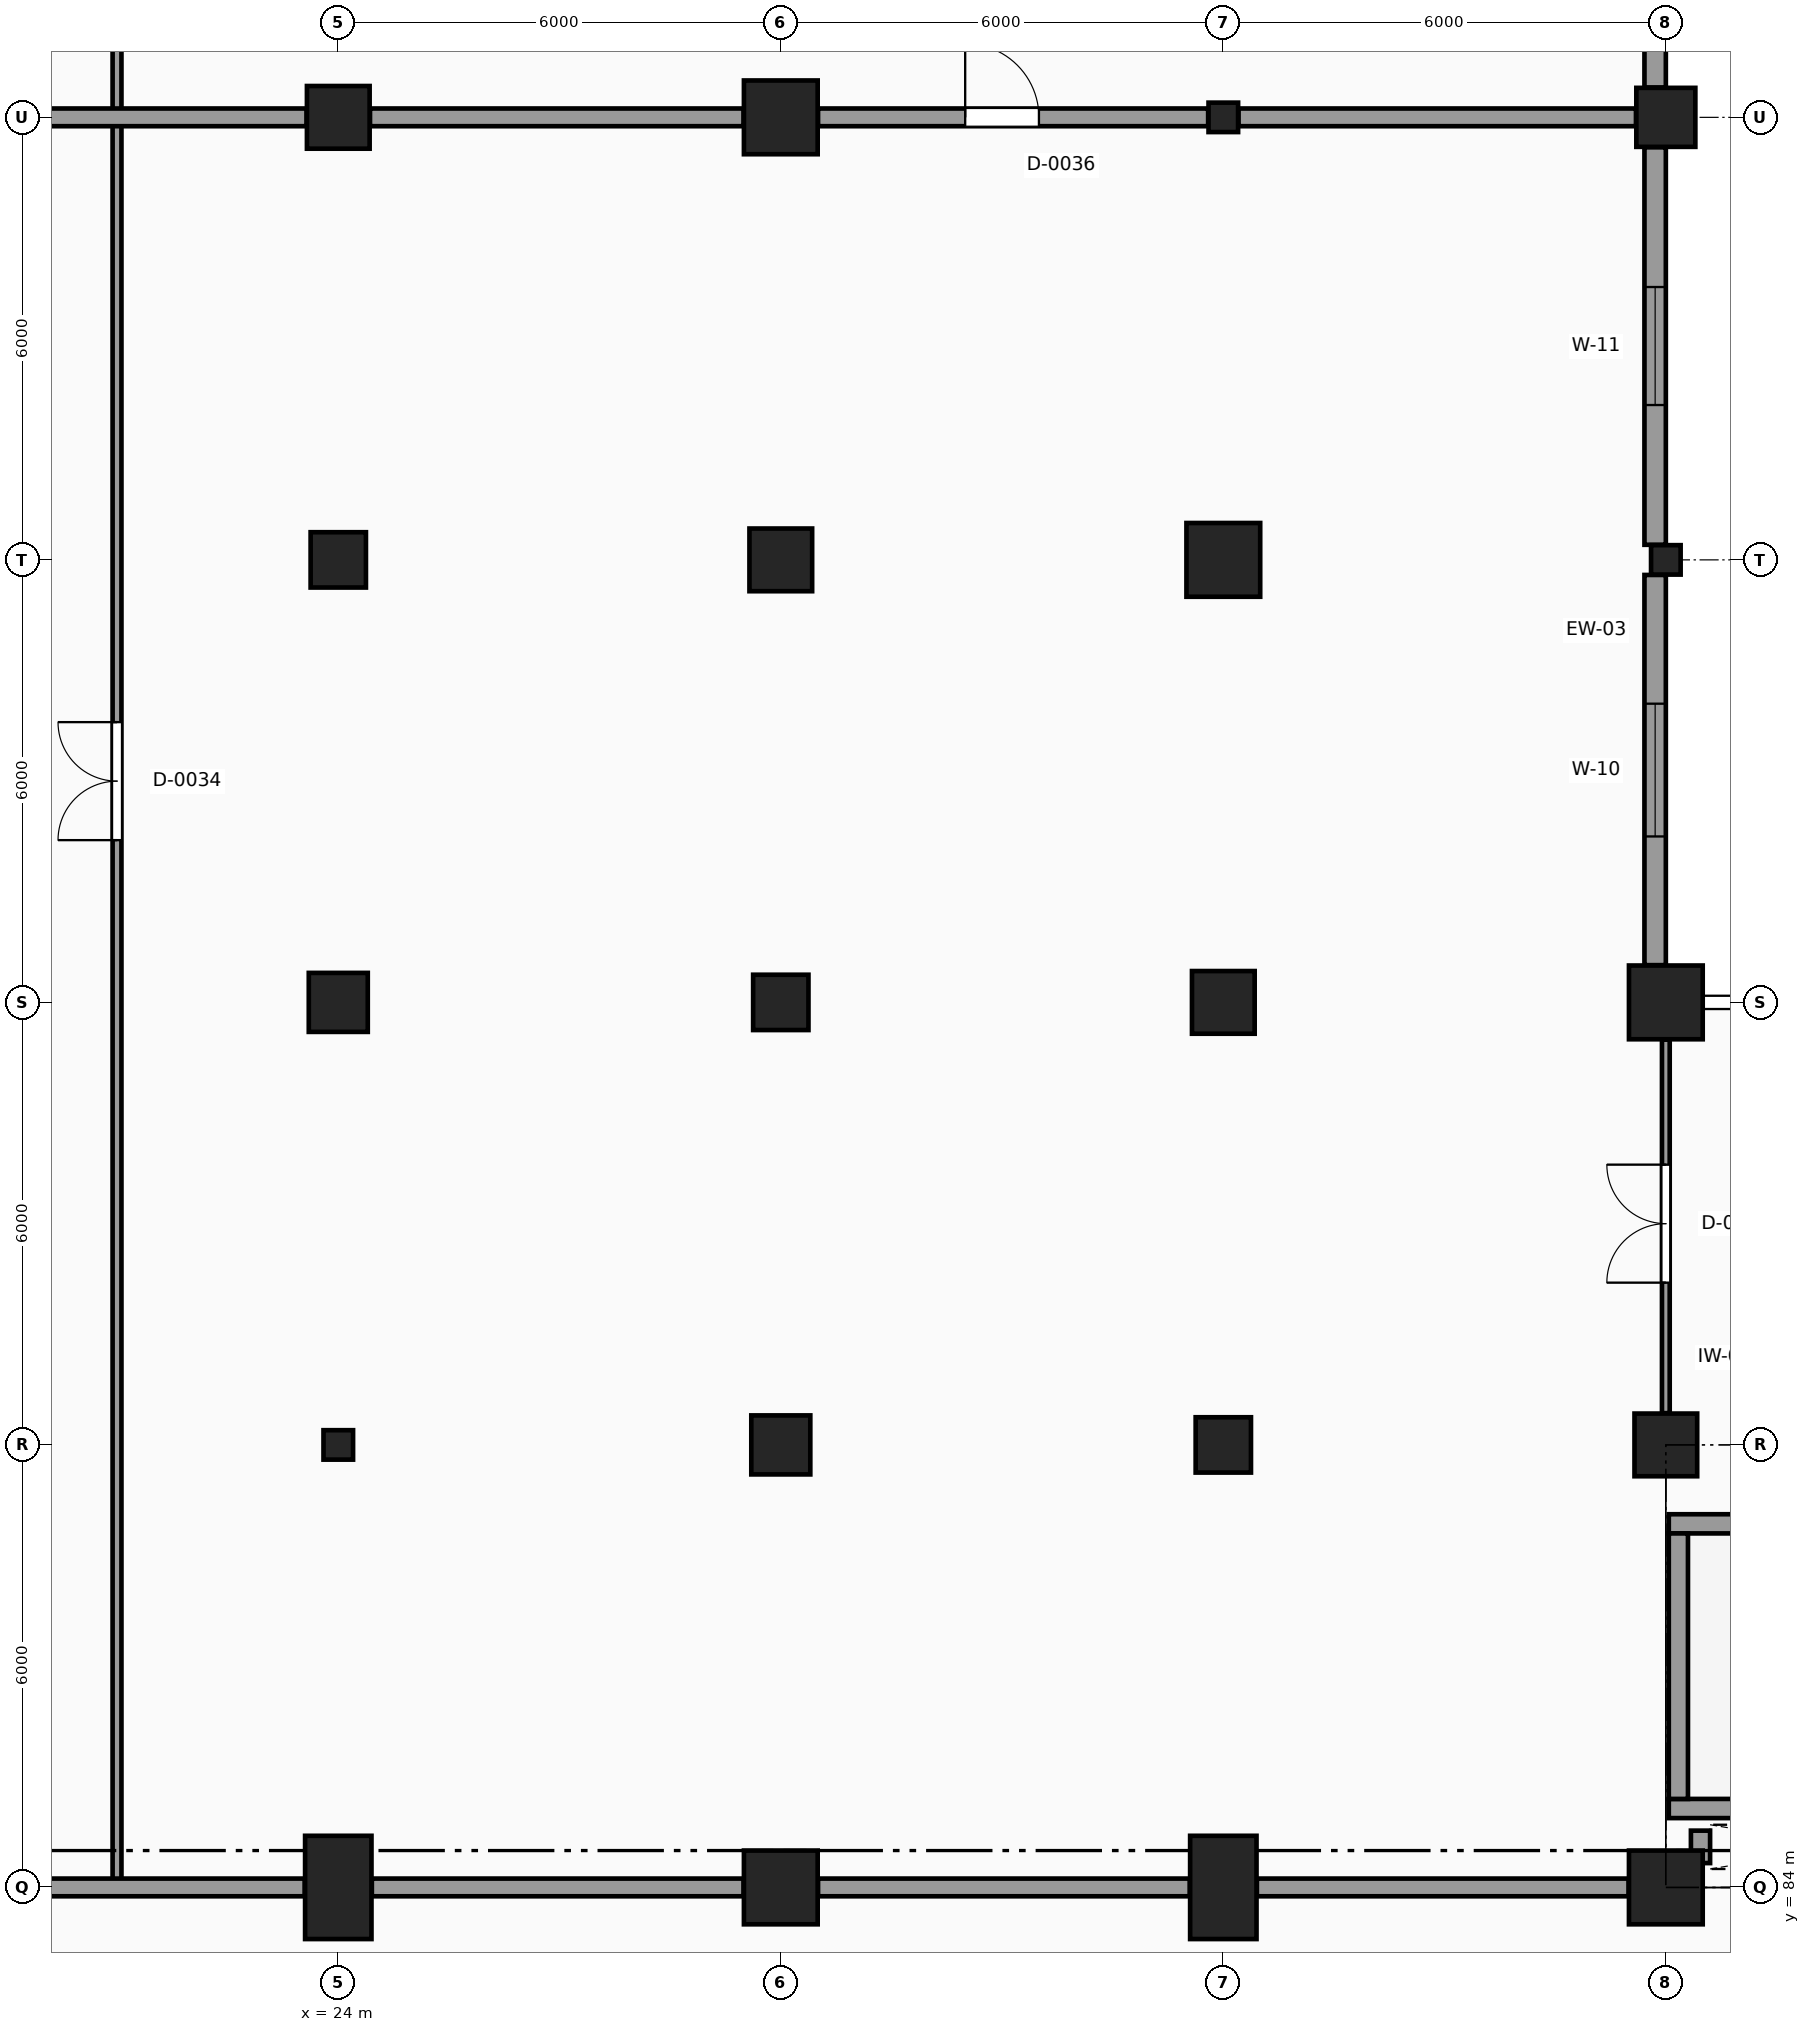
"""IFC4 building model, lengths in metres.
Left out: names, types, materials, properties, quantities, classifications, styles, units other than length and angle.
Written with IfcOpenShell. Run it as: python <this file> out.ifc"""

import sys

from ifc_helpers import new_model, si_unit, direction, frame, frame_2d, origin, origin_2d, place, context, subcontext, project, spatial, rectangle, circle, i_section, extrude, element, fill, save


model = new_model("IFC4")
c1 = context("Model", 3, precision=1e-05, world=origin(), true_north=direction((0.0, 1.0)))
c2 = subcontext(c1, "Body", "Model", "MODEL_VIEW")
j1 = project(units=[si_unit("LENGTHUNIT", "METRE"), si_unit("PLANEANGLEUNIT", "RADIAN")], contexts=[c1])
p1 = place(None, origin())
s1 = spatial("IfcSite", under=j1, at=p1, CompositionType="ELEMENT")
p2 = place(p1, origin())
s2 = spatial("IfcBuilding", under=s1, at=p2, CompositionType="ELEMENT")
p3 = place(p2, origin())
s3 = spatial("IfcBuildingStorey", under=s2, at=p3, CompositionType="ELEMENT", Elevation=0.0)
p4 = place(p3, frame((24.0, 84.0, 0.0), z_axis=(0.0, 0.0, 1.0), x_axis=(1.0, 0.0, 0.0)))
e1 = element("IfcColumn", 1, at=p4, inside=s3, PredefinedType="COLUMN", context=c2, shape_type="SweptSolid", body=[
    extrude(rectangle(XDim=0.9, YDim=1.4, at=origin_2d()), origin(), (0.0, 0.0, 1.0), 6.0),
])
p5 = place(p3, frame((24.0, 90.0, 0.0), z_axis=(0.0, 0.0, 1.0), x_axis=(1.0, 0.0, 0.0)))
e2 = element("IfcColumn", 2, at=p5, inside=s3, PredefinedType="COLUMN", context=c2, shape_type="SweptSolid", body=[
    extrude(i_section(OverallWidth=0.401, OverallDepth=0.399, WebThickness=0.019, FlangeThickness=0.03, FilletRadius=0.015, at=origin_2d()), origin(), (0.0, 0.0, 1.0), 6.0),
])
p6 = place(p3, frame((24.0, 96.0, 0.0), z_axis=(0.0, 0.0, 1.0), x_axis=(1.0, 0.0, 0.0)))
e3 = element("IfcColumn", 3, at=p6, inside=s3, PredefinedType="COLUMN", context=c2, shape_type="SweptSolid", body=[
    extrude(rectangle(XDim=0.8, YDim=0.8, at=origin_2d()), origin(), (0.0, 0.0, 1.0), 6.0),
])
p7 = place(p3, frame((24.0, 102.0, 0.0), z_axis=(0.0, 0.0, 1.0), x_axis=(1.0, 0.0, 0.0)))
e4 = element("IfcColumn", 4, at=p7, inside=s3, PredefinedType="COLUMN", context=c2, shape_type="SweptSolid", body=[
    extrude(rectangle(XDim=0.75, YDim=0.75, at=origin_2d()), origin(), (0.0, 0.0, 1.0), 6.0),
])
p8 = place(p3, frame((24.0, 108.0, 0.0), z_axis=(0.0, 0.0, 1.0), x_axis=(1.0, 0.0, 0.0)))
e5 = element("IfcColumn", 5, at=p8, inside=s3, PredefinedType="COLUMN", context=c2, shape_type="SweptSolid", body=[
    extrude(circle(Radius=0.425, at=origin_2d()), origin(), (0.0, 0.0, 1.0), 6.0),
])
p9 = place(p3, frame((30.0, 84.0, 0.0), z_axis=(0.0, 0.0, 1.0), x_axis=(1.0, 0.0, 0.0)))
e6 = element("IfcColumn", 6, at=p9, inside=s3, PredefinedType="COLUMN", context=c2, shape_type="SweptSolid", body=[
    extrude(rectangle(XDim=1.0, YDim=1.0, at=origin_2d()), origin(), (0.0, 0.0, 1.0), 6.0),
])
p10 = place(p3, frame((30.0, 90.0, 0.0), z_axis=(0.0, 0.0, 1.0), x_axis=(1.0, 0.0, 0.0)))
e7 = element("IfcColumn", 7, at=p10, inside=s3, PredefinedType="COLUMN", context=c2, shape_type="SweptSolid", body=[
    extrude(rectangle(XDim=0.8, YDim=0.8, at=origin_2d()), origin(), (0.0, 0.0, 1.0), 6.0),
])
p11 = place(p3, frame((30.0, 96.0, 0.0), z_axis=(0.0, 0.0, 1.0), x_axis=(1.0, 0.0, 0.0)))
e8 = element("IfcColumn", 8, at=p11, inside=s3, PredefinedType="COLUMN", context=c2, shape_type="SweptSolid", body=[
    extrude(rectangle(XDim=0.75, YDim=0.75, at=origin_2d()), origin(), (0.0, 0.0, 1.0), 6.0),
])
p12 = place(p3, frame((30.0, 102.0, 0.0), z_axis=(0.0, 0.0, 1.0), x_axis=(1.0, 0.0, 0.0)))
e9 = element("IfcColumn", 9, at=p12, inside=s3, PredefinedType="COLUMN", context=c2, shape_type="SweptSolid", body=[
    extrude(circle(Radius=0.425, at=origin_2d()), origin(), (0.0, 0.0, 1.0), 6.0),
])
p13 = place(p3, frame((30.0, 108.0, 0.0), z_axis=(0.0, 0.0, 1.0), x_axis=(1.0, 0.0, 0.0)))
e10 = element("IfcColumn", 10, at=p13, inside=s3, PredefinedType="COLUMN", context=c2, shape_type="SweptSolid", body=[
    extrude(circle(Radius=0.5, at=origin_2d()), origin(), (0.0, 0.0, 1.0), 6.0),
])
p14 = place(p3, frame((36.0, 84.0, 0.0), z_axis=(0.0, 0.0, 1.0), x_axis=(1.0, 0.0, 0.0)))
e11 = element("IfcColumn", 11, at=p14, inside=s3, PredefinedType="COLUMN", context=c2, shape_type="SweptSolid", body=[
    extrude(rectangle(XDim=0.9, YDim=1.4, at=origin_2d()), origin(), (0.0, 0.0, 1.0), 6.0),
])
p15 = place(p3, frame((36.0, 90.0, 0.0), z_axis=(0.0, 0.0, 1.0), x_axis=(1.0, 0.0, 0.0)))
e12 = element("IfcColumn", 12, at=p15, inside=s3, PredefinedType="COLUMN", context=c2, shape_type="SweptSolid", body=[
    extrude(rectangle(XDim=0.75, YDim=0.75, at=origin_2d()), origin(), (0.0, 0.0, 1.0), 6.0),
])
p16 = place(p3, frame((36.0, 96.0, 0.0), z_axis=(0.0, 0.0, 1.0), x_axis=(1.0, 0.0, 0.0)))
e13 = element("IfcColumn", 13, at=p16, inside=s3, PredefinedType="COLUMN", context=c2, shape_type="SweptSolid", body=[
    extrude(circle(Radius=0.425, at=origin_2d()), origin(), (0.0, 0.0, 1.0), 6.0),
])
p17 = place(p3, frame((36.0, 102.0, 0.0), z_axis=(0.0, 0.0, 1.0), x_axis=(1.0, 0.0, 0.0)))
e14 = element("IfcColumn", 14, at=p17, inside=s3, PredefinedType="COLUMN", context=c2, shape_type="SweptSolid", body=[
    extrude(circle(Radius=0.5, at=origin_2d()), origin(), (0.0, 0.0, 1.0), 6.0),
])
p18 = place(p3, frame((36.0, 108.0, 0.0), z_axis=(0.0, 0.0, 1.0), x_axis=(1.0, 0.0, 0.0)))
e15 = element("IfcColumn", 15, at=p18, inside=s3, PredefinedType="COLUMN", context=c2, shape_type="SweptSolid", body=[
    extrude(i_section(OverallWidth=0.401, OverallDepth=0.399, WebThickness=0.019, FlangeThickness=0.03, FilletRadius=0.015, at=origin_2d()), origin(), (0.0, 0.0, 1.0), 6.0),
])
p19 = place(p3, frame((42.0, 84.0, 0.0), z_axis=(0.0, 0.0, 1.0), x_axis=(1.0, 0.0, 0.0)))
e16 = element("IfcColumn", 16, at=p19, inside=s3, PredefinedType="COLUMN", context=c2, shape_type="SweptSolid", body=[
    extrude(rectangle(XDim=1.0, YDim=1.0, at=origin_2d()), origin(), (0.0, 0.0, 1.0), 6.0),
])
p20 = place(p3, frame((42.0, 90.0, 0.0), z_axis=(0.0, 0.0, 1.0), x_axis=(1.0, 0.0, 0.0)))
e17 = element("IfcColumn", 17, at=p20, inside=s3, PredefinedType="COLUMN", context=c2, shape_type="SweptSolid", body=[
    extrude(circle(Radius=0.425, at=origin_2d()), origin(), (0.0, 0.0, 1.0), 6.0),
])
p21 = place(p3, frame((42.0, 96.0, 0.0), z_axis=(0.0, 0.0, 1.0), x_axis=(1.0, 0.0, 0.0)))
e18 = element("IfcColumn", 18, at=p21, inside=s3, PredefinedType="COLUMN", context=c2, shape_type="SweptSolid", body=[
    extrude(circle(Radius=0.5, at=origin_2d()), origin(), (0.0, 0.0, 1.0), 6.0),
])
p22 = place(p3, frame((42.0, 102.0, 0.0), z_axis=(0.0, 0.0, 1.0), x_axis=(1.0, 0.0, 0.0)))
e19 = element("IfcColumn", 19, at=p22, inside=s3, PredefinedType="COLUMN", context=c2, shape_type="SweptSolid", body=[
    extrude(i_section(OverallWidth=0.401, OverallDepth=0.399, WebThickness=0.019, FlangeThickness=0.03, FilletRadius=0.015, at=origin_2d()), origin(), (0.0, 0.0, 1.0), 6.0),
])
p23 = place(p3, frame((42.0, 108.0, 0.0), z_axis=(0.0, 0.0, 1.0), x_axis=(1.0, 0.0, 0.0)))
e20 = element("IfcColumn", 20, at=p23, inside=s3, PredefinedType="COLUMN", context=c2, shape_type="SweptSolid", body=[
    extrude(rectangle(XDim=0.8, YDim=0.8, at=origin_2d()), origin(), (0.0, 0.0, 1.0), 6.0),
])
p24 = place(p3, frame((41.855, 96.505, 0.0), z_axis=(0.0, 0.0, 1.0), x_axis=(0.0, 1.0, 0.0)))
e21 = element("IfcWall", 21, at=p24, inside=s3, PredefinedType="SOLIDWALL", context=c2, shape_type="SweptSolid", body=[
    extrude(rectangle(XDim=5.291, YDim=0.29, at=frame_2d((2.645, 0.0))), origin(), (0.0, 0.0, 1.0), 4.99),
])
p25 = place(p24, frame((1.745, 0.0, 0.85)))
e22 = element("IfcOpeningElement", 22, at=p25, cuts=e21, PredefinedType="OPENING", context=c2, shape_type="SweptSolid", body=[
    extrude(rectangle(XDim=1.8, YDim=1.7, at=frame_2d((0.9, 0.85))), frame((0.0, 0.155, 0.0), z_axis=(0.0, -1.0, 0.0), x_axis=(1.0, 0.0, 0.0)), (0.0, 0.0, 1.0), 0.31),
])
p26 = place(p3, frame((41.855, 102.205, 0.0), z_axis=(0.0, 0.0, 1.0), x_axis=(0.0, 1.0, 0.0)))
e23 = element("IfcWall", 23, at=p26, inside=s3, PredefinedType="SOLIDWALL", context=c2, shape_type="SweptSolid", body=[
    extrude(rectangle(XDim=5.39, YDim=0.29, at=frame_2d((2.695, 0.0))), origin(), (0.0, 0.0, 1.0), 4.99),
])
p27 = place(p26, frame((1.895, 0.0, 0.85)))
e24 = element("IfcOpeningElement", 24, at=p27, cuts=e23, PredefinedType="OPENING", context=c2, shape_type="SweptSolid", body=[
    extrude(rectangle(XDim=1.6, YDim=1.5, at=frame_2d((0.8, 0.75))), frame((0.0, 0.155, 0.0), z_axis=(0.0, -1.0, 0.0), x_axis=(1.0, 0.0, 0.0)), (0.0, 0.0, 1.0), 0.31),
])
p28 = place(p3, frame((41.855, 108.405, 0.0), z_axis=(0.0, 0.0, 1.0), x_axis=(0.0, 1.0, 0.0)))
e25 = element("IfcWall", 25, at=p28, inside=s3, PredefinedType="SOLIDWALL", context=c2, shape_type="SweptSolid", body=[
    extrude(rectangle(XDim=5.215, YDim=0.29, at=frame_2d((2.607, 0.0))), origin(), (0.0, 0.0, 1.0), 4.99),
])
p29 = place(p28, frame((1.858, 0.0, 0.85)))
e26 = element("IfcOpeningElement", 26, at=p29, cuts=e25, PredefinedType="OPENING", context=c2, shape_type="SweptSolid", body=[
    extrude(rectangle(XDim=1.5, YDim=1.5, at=frame_2d((0.75, 0.75))), frame((0.0, 0.155, 0.0), z_axis=(0.0, -1.0, 0.0), x_axis=(1.0, 0.0, 0.0)), (0.0, 0.0, 1.0), 0.31),
])
for number, where, z_axis, x_axis in (
    (27, (42.04, 85.07, 0.0), (0.0, 0.0, 1.0), (1.0, 0.0, 0.0)),
    (28, (42.04, 88.93, 0.0), (0.0, 0.0, 1.0), (1.0, 0.0, 0.0)),
):
    element("IfcWall", number, at=place(p3, frame(where, z_axis=z_axis, x_axis=x_axis)), inside=s3, PredefinedType="SHEAR", context=c2, shape_type="SweptSolid", body=[
        extrude(rectangle(XDim=10.72, YDim=0.26, at=frame_2d((5.36, 0.0))), origin(), (0.0, 0.0, 1.0), 6.0),
    ])
p30 = place(p3, frame((42.17, 85.2, 0.0), z_axis=(0.0, 0.0, 1.0), x_axis=(0.0, 1.0, 0.0)))
e29 = element("IfcWall", 29, at=p30, inside=s3, PredefinedType="SHEAR", context=c2, shape_type="SweptSolid", body=[
    extrude(rectangle(XDim=3.6, YDim=0.26, at=frame_2d((1.8, 0.0))), origin(), (0.0, 0.0, 1.0), 6.0),
])
p31 = place(p3, frame((42.47, 84.33, 0.0), z_axis=(0.0, 0.0, 1.0), x_axis=(0.0, 1.0, 0.0)))
e30 = element("IfcWall", 30, at=p31, inside=s3, PredefinedType="SHEAR", context=c2, shape_type="SweptSolid", body=[
    extrude(rectangle(XDim=0.44, YDim=0.26, at=frame_2d((0.22, 0.0))), origin(), (0.0, 0.0, 1.0), 6.0),
])
p32 = place(p3, frame((21.0, 84.0, 0.0), z_axis=(0.0, 0.0, 1.0), x_axis=(0.0, 1.0, 0.0)))
e31 = element("IfcWall", 31, at=p32, inside=s3, PredefinedType="PARTITIONING", context=c2, shape_type="SweptSolid", body=[
    extrude(rectangle(XDim=35.705, YDim=0.12, at=frame_2d((17.853, 0.0))), origin(), (0.0, 0.0, 1.0), 5.24),
])
p33 = place(p32, frame((14.2, 0.0, 0.0)))
e32 = element("IfcOpeningElement", 32, at=p33, cuts=e31, PredefinedType="OPENING", context=c2, shape_type="SweptSolid", body=[
    extrude(rectangle(XDim=1.6, YDim=2.25, at=frame_2d((0.8, 1.125))), frame((0.0, 0.07, 0.0), z_axis=(0.0, -1.0, 0.0), x_axis=(1.0, 0.0, 0.0)), (0.0, 0.0, 1.0), 0.14),
])
p34 = place(p3, frame((42.0, 90.43, 0.0), z_axis=(0.0, 0.0, 1.0), x_axis=(0.0, 1.0, 0.0)))
e33 = element("IfcWall", 33, at=p34, inside=s3, PredefinedType="PARTITIONING", context=c2, shape_type="SweptSolid", body=[
    extrude(rectangle(XDim=5.065, YDim=0.105, at=frame_2d((2.533, 0.0))), origin(), (0.0, 0.0, 1.0), 5.04),
])
p35 = place(p34, frame((1.77, 0.0, 0.0)))
e34 = element("IfcOpeningElement", 34, at=p35, cuts=e33, PredefinedType="OPENING", context=c2, shape_type="SweptSolid", body=[
    extrude(rectangle(XDim=1.6, YDim=2.25, at=frame_2d((0.8, 1.125))), frame((0.0, 0.062, 0.0), z_axis=(0.0, -1.0, 0.0), x_axis=(1.0, 0.0, 0.0)), (0.0, 0.0, 1.0), 0.125),
])
p36 = place(p3, frame((18.505, 84.0, 0.0), z_axis=(0.0, 0.0, 1.0), x_axis=(1.0, 0.0, 0.0)))
e35 = element("IfcWall", 35, at=p36, inside=s3, PredefinedType="PARTITIONING", context=c2, shape_type="SweptSolid", body=[
    extrude(rectangle(XDim=5.04, YDim=0.24, at=frame_2d((2.52, 0.0))), origin(), (0.0, 0.0, 1.0), 5.45),
])
p37 = place(p3, frame((24.455, 84.0, 0.0), z_axis=(0.0, 0.0, 1.0), x_axis=(1.0, 0.0, 0.0)))
e36 = element("IfcWall", 36, at=p37, inside=s3, PredefinedType="PARTITIONING", context=c2, shape_type="SweptSolid", body=[
    extrude(rectangle(XDim=5.04, YDim=0.24, at=frame_2d((2.52, 0.0))), origin(), (0.0, 0.0, 1.0), 4.94),
])
p38 = place(p3, frame((30.505, 84.0, 0.0), z_axis=(0.0, 0.0, 1.0), x_axis=(1.0, 0.0, 0.0)))
e37 = element("IfcWall", 37, at=p38, inside=s3, PredefinedType="PARTITIONING", context=c2, shape_type="SweptSolid", body=[
    extrude(rectangle(XDim=5.04, YDim=0.24, at=frame_2d((2.52, 0.0))), origin(), (0.0, 0.0, 1.0), 5.04),
])
p39 = place(p3, frame((36.455, 84.0, 0.0), z_axis=(0.0, 0.0, 1.0), x_axis=(1.0, 0.0, 0.0)))
e38 = element("IfcWall", 38, at=p39, inside=s3, PredefinedType="PARTITIONING", context=c2, shape_type="SweptSolid", body=[
    extrude(rectangle(XDim=5.04, YDim=0.24, at=frame_2d((2.52, 0.0))), origin(), (0.0, 0.0, 1.0), 5.14),
])
p40 = place(p3, frame((18.38, 108.0, 0.0), z_axis=(0.0, 0.0, 1.0), x_axis=(1.0, 0.0, 0.0)))
e39 = element("IfcWall", 39, at=p40, inside=s3, PredefinedType="PARTITIONING", context=c2, shape_type="SweptSolid", body=[
    extrude(rectangle(XDim=5.19, YDim=0.24, at=frame_2d((2.595, 0.0))), origin(), (0.0, 0.0, 1.0), 5.45),
])
p41 = place(p3, frame((24.43, 108.0, 0.0), z_axis=(0.0, 0.0, 1.0), x_axis=(1.0, 0.0, 0.0)))
e40 = element("IfcWall", 40, at=p41, inside=s3, PredefinedType="PARTITIONING", context=c2, shape_type="SweptSolid", body=[
    extrude(rectangle(XDim=5.065, YDim=0.24, at=frame_2d((2.533, 0.0))), origin(), (0.0, 0.0, 1.0), 4.94),
])
p42 = place(p3, frame((30.505, 108.0, 0.0), z_axis=(0.0, 0.0, 1.0), x_axis=(1.0, 0.0, 0.0)))
e41 = element("IfcWall", 41, at=p42, inside=s3, PredefinedType="PARTITIONING", context=c2, shape_type="SweptSolid", body=[
    extrude(rectangle(XDim=5.29, YDim=0.24, at=frame_2d((2.645, 0.0))), origin(), (0.0, 0.0, 1.0), 5.04),
])
p43 = place(p42, frame((1.995, 0.0, 0.0)))
e42 = element("IfcOpeningElement", 42, at=p43, cuts=e41, PredefinedType="OPENING", context=c2, shape_type="SweptSolid", body=[
    extrude(rectangle(XDim=1.0, YDim=2.15, at=frame_2d((0.5, 1.075))), frame((0.0, 0.13, 0.0), z_axis=(0.0, -1.0, 0.0), x_axis=(1.0, 0.0, 0.0)), (0.0, 0.0, 1.0), 0.26),
])
p44 = place(p3, frame((36.206, 108.0, 0.0), z_axis=(0.0, 0.0, 1.0), x_axis=(1.0, 0.0, 0.0)))
e43 = element("IfcWall", 43, at=p44, inside=s3, PredefinedType="PARTITIONING", context=c2, shape_type="SweptSolid", body=[
    extrude(rectangle(XDim=5.389, YDim=0.24, at=frame_2d((2.695, 0.0))), origin(), (0.0, 0.0, 1.0), 5.14),
])
p45 = place(p25, origin())
e44 = element("IfcWindow", 44, at=p45, inside=s3, PartitioningType="SINGLE_PANEL", PredefinedType="WINDOW", context=c2, shape_type="SweptSolid", body=[
    extrude(rectangle(XDim=1.8, YDim=1.7, at=frame_2d((0.9, 0.85))), frame((0.0, 0.03, 0.0), z_axis=(0.0, -1.0, 0.0), x_axis=(1.0, 0.0, 0.0)), (0.0, 0.0, 1.0), 0.06),
])
fill(e22, e44)
p46 = place(p27, origin())
e45 = element("IfcWindow", 45, at=p46, inside=s3, PartitioningType="SINGLE_PANEL", PredefinedType="WINDOW", context=c2, shape_type="SweptSolid", body=[
    extrude(rectangle(XDim=1.6, YDim=1.5, at=frame_2d((0.8, 0.75))), frame((0.0, 0.03, 0.0), z_axis=(0.0, -1.0, 0.0), x_axis=(1.0, 0.0, 0.0)), (0.0, 0.0, 1.0), 0.06),
])
fill(e24, e45)
p47 = place(p35, origin())
e46 = element("IfcDoor", 46, at=p47, inside=s3, OperationType="DOUBLE_DOOR_SINGLE_SWING", PredefinedType="DOOR", context=c2, shape_type="SweptSolid", body=[
    extrude(rectangle(XDim=1.6, YDim=2.25, at=frame_2d((0.8, 1.125))), frame((0.0, 0.025, 0.0), z_axis=(0.0, -1.0, 0.0), x_axis=(1.0, 0.0, 0.0)), (0.0, 0.0, 1.0), 0.05),
])
fill(e34, e46)
p48 = place(p33, origin())
e47 = element("IfcDoor", 47, at=p48, inside=s3, OperationType="DOUBLE_DOOR_SINGLE_SWING", PredefinedType="DOOR", context=c2, shape_type="SweptSolid", body=[
    extrude(rectangle(XDim=1.6, YDim=2.25, at=frame_2d((0.8, 1.125))), frame((0.0, 0.025, 0.0), z_axis=(0.0, -1.0, 0.0), x_axis=(1.0, 0.0, 0.0)), (0.0, 0.0, 1.0), 0.05),
])
fill(e32, e47)
p49 = place(p43, origin())
e48 = element("IfcDoor", 48, at=p49, inside=s3, OperationType="SINGLE_SWING_LEFT", PredefinedType="DOOR", context=c2, shape_type="SweptSolid", body=[
    extrude(rectangle(XDim=1.0, YDim=2.15, at=frame_2d((0.5, 1.075))), frame((0.0, 0.025, 0.0), z_axis=(0.0, -1.0, 0.0), x_axis=(1.0, 0.0, 0.0)), (0.0, 0.0, 1.0), 0.05),
])
fill(e42, e48)
save(model, sys.argv[1])
